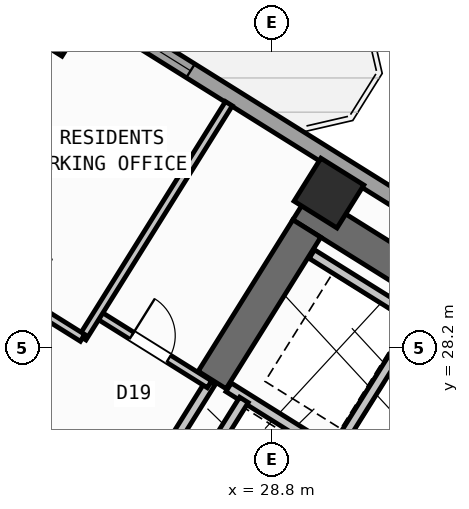
"""IFC4 building model, lengths in metres.
Left out: names, types, materials, properties, quantities, classifications, styles, units other than length and angle.
Written with IfcOpenShell. Run it as: python <this file> out.ifc"""

import sys

from ifc_helpers import new_model, si_unit, direction, frame, frame_2d, origin, origin_2d, place, context, subcontext, project, spatial, rectangle, hollow_rectangle, extrude, source, transform, mapped, element, fill, save


model = new_model("IFC4")
c1 = context("Model", 3, precision=1e-05, world=origin(), true_north=direction((0.0, 1.0)))
c2 = subcontext(c1, "Body", "Model", "MODEL_VIEW")
j1 = project(units=[si_unit("LENGTHUNIT", "METRE"), si_unit("PLANEANGLEUNIT", "RADIAN")], contexts=[c1])
p1 = place(None, origin())
s1 = spatial("IfcSite", under=j1, at=p1, CompositionType="ELEMENT")
p2 = place(p1, origin())
s2 = spatial("IfcBuilding", under=s1, at=p2, CompositionType="ELEMENT")
p3 = place(p2, frame((0.0, 0.0, 63.6)))
s3 = spatial("IfcBuildingStorey", under=s2, at=p3, CompositionType="ELEMENT", Elevation=63.6)
p4 = place(p3, frame((40.615, 23.983, 0.0), z_axis=(0.0, 0.0, 1.0), x_axis=(-0.848045953968, 0.529922692436, 0.0)))
e1 = element("IfcWall", 1, at=p4, inside=s3, PredefinedType="SHEAR", context=c2, shape_type="SweptSolid", body=[
    extrude(rectangle(XDim=13.24, YDim=0.65, at=frame_2d((6.62, 0.0))), origin(), (0.0, 0.0, 1.0), 3.35),
])
p5 = place(p3, frame((29.491, 30.552, 0.0), z_axis=(0.0, 0.0, 1.0), x_axis=(-0.529893103397, -0.8480644427, 0.0)))
e2 = element("IfcWall", 2, at=p5, inside=s3, PredefinedType="SHEAR", context=c2, shape_type="SweptSolid", body=[
    extrude(rectangle(XDim=3.525, YDim=0.65, at=frame_2d((1.763, 0.0))), origin(), (0.0, 0.0, 1.0), 3.35),
])
m1 = source(origin(), c2, "Body", "SweptSolid", [
    extrude(hollow_rectangle(XDim=1.0, YDim=1.0, WallThickness=0.04, at=origin_2d()), origin(), (0.0, 0.0, 1.0), 3.6),
])
for number, where, z_axis, x_axis in (
    (3, (29.928, 31.251, 0.0), (0.0, 0.0, 1.0), (-0.848, 0.53, 0.0)),
    (4, (24.5, 34.643, 0.0), (0.0, 0.0, 1.0), (-0.848, 0.53, 0.0)),
):
    element("IfcColumn", number, at=place(p3, frame(where, z_axis=z_axis, x_axis=x_axis)), inside=s3, PredefinedType="COLUMN", context=c2, shape_type="MappedRepresentation", body=[
        mapped(m1, transform((0.0, 0.0, 0.0), scale=1.0)),
    ])
p6 = place(p3, frame((14.138, 41.825, 0.0), z_axis=(0.0, 0.0, 1.0), x_axis=(0.848046498049, -0.529921821731, 0.0)))
e5 = element("IfcWall", 5, at=p6, inside=s3, PredefinedType="STANDARD", context=c2, shape_type="SweptSolid", body=[
    extrude(rectangle(XDim=31.588, YDim=0.32, at=frame_2d((15.794, 0.0))), origin(), (0.0, 0.0, 1.0), 3.35),
])
p7 = place(p6, frame((2.526, 0.0, 0.0)))
e6 = element("IfcOpeningElement", 6, at=p7, cuts=e5, PredefinedType="OPENING", context=c2, shape_type="SweptSolid", body=[
    extrude(rectangle(XDim=1.05, YDim=2.15, at=frame_2d((0.525, 1.075))), frame((0.0, 0.17, 0.0), z_axis=(0.0, -1.0, 0.0), x_axis=(1.0, 0.0, 0.0)), (0.0, 0.0, 1.0), 0.34),
])
p8 = place(p6, frame((0.825, 0.0, 0.95)))
e7 = element("IfcOpeningElement", 7, at=p8, cuts=e5, PredefinedType="OPENING", context=c2, shape_type="SweptSolid", body=[
    extrude(rectangle(XDim=1.2, YDim=1.4, at=frame_2d((0.6, 0.7))), frame((0.0, 0.17, 0.0), z_axis=(0.0, -1.0, 0.0), x_axis=(1.0, 0.0, 0.0)), (0.0, 0.0, 1.0), 0.34),
])
p9 = place(p6, frame((9.502, 0.0, 0.85)))
e8 = element("IfcOpeningElement", 8, at=p9, cuts=e5, PredefinedType="OPENING", context=c2, shape_type="SweptSolid", body=[
    extrude(rectangle(XDim=1.8, YDim=1.5, at=frame_2d((0.9, 0.75))), frame((0.0, 0.17, 0.0), z_axis=(0.0, -1.0, 0.0), x_axis=(1.0, 0.0, 0.0)), (0.0, 0.0, 1.0), 0.34),
])
p10 = place(p6, frame((13.899, 0.0, 0.85)))
e9 = element("IfcOpeningElement", 9, at=p10, cuts=e5, PredefinedType="OPENING", context=c2, shape_type="SweptSolid", body=[
    extrude(rectangle(XDim=1.5, YDim=1.5, at=frame_2d((0.75, 0.75))), frame((0.0, 0.17, 0.0), z_axis=(0.0, -1.0, 0.0), x_axis=(1.0, 0.0, 0.0)), (0.0, 0.0, 1.0), 0.34),
])
p11 = place(p6, frame((22.019, 0.0, 0.95)))
e10 = element("IfcOpeningElement", 10, at=p11, cuts=e5, PredefinedType="OPENING", context=c2, shape_type="SweptSolid", body=[
    extrude(rectangle(XDim=1.2, YDim=1.4, at=frame_2d((0.6, 0.7))), frame((0.0, 0.17, 0.0), z_axis=(0.0, -1.0, 0.0), x_axis=(1.0, 0.0, 0.0)), (0.0, 0.0, 1.0), 0.34),
])
p12 = place(p6, frame((27.569, 0.0, 0.95)))
e11 = element("IfcOpeningElement", 11, at=p12, cuts=e5, PredefinedType="OPENING", context=c2, shape_type="SweptSolid", body=[
    extrude(rectangle(XDim=1.2, YDim=1.4, at=frame_2d((0.6, 0.7))), frame((0.0, 0.17, 0.0), z_axis=(0.0, -1.0, 0.0), x_axis=(1.0, 0.0, 0.0)), (0.0, 0.0, 1.0), 0.34),
])
p13 = place(p3, frame((31.822, 24.998, 0.0), z_axis=(0.0, 0.0, 1.0), x_axis=(-0.848058348634, 0.529902856485, 0.0)))
e12 = element("IfcWall", 12, at=p13, inside=s3, PredefinedType="STANDARD", context=c2, shape_type="SweptSolid", body=[
    extrude(rectangle(XDim=4.568, YDim=0.2, at=frame_2d((2.284, 0.0))), origin(), (0.0, 0.0, 1.0), 3.34),
])
p14 = place(p3, frame((28.25, 27.17, 0.0), z_axis=(0.0, 0.0, 1.0), x_axis=(-0.529905827651, -0.848056492117, 0.0)))
e13 = element("IfcWall", 13, at=p14, inside=s3, PredefinedType="STANDARD", context=c2, shape_type="SweptSolid", body=[
    extrude(rectangle(XDim=1.65, YDim=0.2, at=frame_2d((0.825, 0.0))), origin(), (0.0, 0.0, 1.0), 3.34),
])
p15 = place(p3, frame((31.645, 28.716, 0.0), z_axis=(0.0, 0.0, 1.0), x_axis=(-0.52986693015, -0.848080795876, 0.0)))
e14 = element("IfcWall", 14, at=p15, inside=s3, PredefinedType="STANDARD", context=c2, shape_type="SweptSolid", body=[
    extrude(rectangle(XDim=2.66, YDim=0.2, at=frame_2d((1.33, 0.0))), origin(), (0.0, 0.0, 1.0), 3.34),
])
p16 = place(p3, frame((33.363, 27.69, 0.0), z_axis=(0.0, 0.0, 1.0), x_axis=(-0.848053806312, 0.529910125964, 0.0)))
e15 = element("IfcWall", 15, at=p16, inside=s3, PredefinedType="STANDARD", context=c2, shape_type="SweptSolid", body=[
    extrude(rectangle(XDim=4.448, YDim=0.2, at=frame_2d((2.224, 0.0))), origin(), (0.0, 0.0, 1.0), 3.34),
])
p17 = place(p3, frame((27.596, 27.52, 0.0), z_axis=(0.0, 0.0, 1.0), x_axis=(-0.529865479138, -0.848081702443, 0.0)))
e16 = element("IfcWall", 16, at=p17, inside=s3, PredefinedType="STANDARD", context=c2, shape_type="SweptSolid", body=[
    extrude(rectangle(XDim=2.96, YDim=0.2, at=frame_2d((1.48, 0.0))), origin(), (0.0, 0.0, 1.0), 3.34),
])
p18 = place(p17, frame((1.76, 0.0, 0.0)))
e17 = element("IfcOpeningElement", 17, at=p18, cuts=e16, PredefinedType="OPENING", context=c2, shape_type="SweptSolid", body=[
    extrude(rectangle(XDim=0.86, YDim=2.05, at=frame_2d((0.43, 1.025))), frame((0.0, 0.11, 0.0), z_axis=(0.0, -1.0, 0.0), x_axis=(1.0, 0.0, 0.0)), (0.0, 0.0, 1.0), 0.22),
])
p19 = place(p3, frame((27.57, 27.478, 0.0), z_axis=(0.0, 0.0, 1.0), x_axis=(-0.848050851465, 0.529914854792, 0.0)))
e18 = element("IfcWall", 18, at=p19, inside=s3, PredefinedType="PARTITIONING", context=c2, shape_type="SweptSolid", body=[
    extrude(rectangle(XDim=2.61, YDim=0.16, at=frame_2d((1.305, 0.0))), origin(), (0.0, 0.0, 1.0), 3.34),
])
p20 = place(p19, frame((0.95, 0.0, 0.0)))
e19 = element("IfcOpeningElement", 19, at=p20, cuts=e18, PredefinedType="OPENING", context=c2, shape_type="SweptSolid", body=[
    extrude(rectangle(XDim=0.86, YDim=2.05, at=frame_2d((0.43, 1.025))), frame((0.0, 0.09, 0.0), z_axis=(0.0, -1.0, 0.0), x_axis=(1.0, 0.0, 0.0)), (0.0, 0.0, 1.0), 0.18),
])
p21 = place(p3, frame((27.953, 33.016, 0.0), z_axis=(0.0, 0.0, 1.0), x_axis=(-0.529906322364, -0.848056182997, 0.0)))
e20 = element("IfcWall", 20, at=p21, inside=s3, PredefinedType="PARTITIONING", context=c2, shape_type="SweptSolid", body=[
    extrude(rectangle(XDim=5.45, YDim=0.16, at=frame_2d((2.725, 0.0))), origin(), (0.0, 0.0, 1.0), 3.34),
])
p22 = place(p3, frame((25.065, 28.394, 0.0), z_axis=(0.0, 0.0, 1.0), x_axis=(-0.848048310262, 0.529918921593, 0.0)))
e21 = element("IfcWall", 21, at=p22, inside=s3, PredefinedType="PARTITIONING", context=c2, shape_type="SweptSolid", body=[
    extrude(rectangle(XDim=16.73, YDim=0.16, at=frame_2d((8.365, 0.0))), origin(), (0.0, 0.0, 1.0), 3.34),
])
p23 = place(p22, frame((1.338, 0.0, 0.0)))
e22 = element("IfcOpeningElement", 22, at=p23, cuts=e21, PredefinedType="OPENING", context=c2, shape_type="SweptSolid", body=[
    extrude(rectangle(XDim=1.0, YDim=2.1, at=frame_2d((0.5, 1.05))), frame((0.0, 0.09, 0.0), z_axis=(0.0, -1.0, 0.0), x_axis=(1.0, 0.0, 0.0)), (0.0, 0.0, 1.0), 0.18),
])
p24 = place(p22, frame((5.265, 0.0, 0.0)))
e23 = element("IfcOpeningElement", 23, at=p24, cuts=e21, PredefinedType="OPENING", context=c2, shape_type="SweptSolid", body=[
    extrude(rectangle(XDim=1.0, YDim=2.1, at=frame_2d((0.5, 1.05))), frame((0.0, 0.09, 0.0), z_axis=(0.0, -1.0, 0.0), x_axis=(1.0, 0.0, 0.0)), (0.0, 0.0, 1.0), 0.18),
])
p25 = place(p22, frame((9.526, 0.0, 0.0)))
e24 = element("IfcOpeningElement", 24, at=p25, cuts=e21, PredefinedType="OPENING", context=c2, shape_type="SweptSolid", body=[
    extrude(rectangle(XDim=1.0, YDim=2.1, at=frame_2d((0.5, 1.05))), frame((0.0, 0.09, 0.0), z_axis=(0.0, -1.0, 0.0), x_axis=(1.0, 0.0, 0.0)), (0.0, 0.0, 1.0), 0.18),
])
p26 = place(p22, frame((13.954, 0.0, 0.0)))
e25 = element("IfcOpeningElement", 25, at=p26, cuts=e21, PredefinedType="OPENING", context=c2, shape_type="SweptSolid", body=[
    extrude(rectangle(XDim=1.0, YDim=2.1, at=frame_2d((0.5, 1.05))), frame((0.0, 0.09, 0.0), z_axis=(0.0, -1.0, 0.0), x_axis=(1.0, 0.0, 0.0)), (0.0, 0.0, 1.0), 0.18),
])
m2 = source(origin(), c2, "Body", "SweptSolid", [
    extrude(rectangle(XDim=1.5, YDim=1.5, at=frame_2d((0.75, 0.75))), frame((0.0, 0.03, 0.0), z_axis=(0.0, -1.0, 0.0), x_axis=(1.0, 0.0, 0.0)), (0.0, 0.0, 1.0), 0.06),
])
p27 = place(p10, origin())
e26 = element("IfcWindow", 26, at=p27, inside=s3, PartitioningType="SINGLE_PANEL", PredefinedType="WINDOW", context=c2, shape_type="MappedRepresentation", body=[
    mapped(m2, transform((0.0, 0.0, 0.0), scale=1.0)),
])
fill(e9, e26)
m3 = source(origin(), c2, "Body", "SweptSolid", [
    extrude(rectangle(XDim=0.86, YDim=2.05, at=frame_2d((0.43, 1.025))), frame((0.0, 0.025, 0.0), z_axis=(0.0, -1.0, 0.0), x_axis=(1.0, 0.0, 0.0)), (0.0, 0.0, 1.0), 0.05),
])
p28 = place(p20, frame((0.86, 0.0, 0.0), z_axis=(0.0, 0.0, 1.0), x_axis=(-1.0, 0.0, 0.0)))
e27 = element("IfcDoor", 27, at=p28, inside=s3, OperationType="SINGLE_SWING_LEFT", PredefinedType="DOOR", context=c2, shape_type="MappedRepresentation", body=[
    mapped(m3, transform((0.0, 0.0, 0.0), scale=1.0)),
])
fill(e19, e27)
save(model, sys.argv[1])
